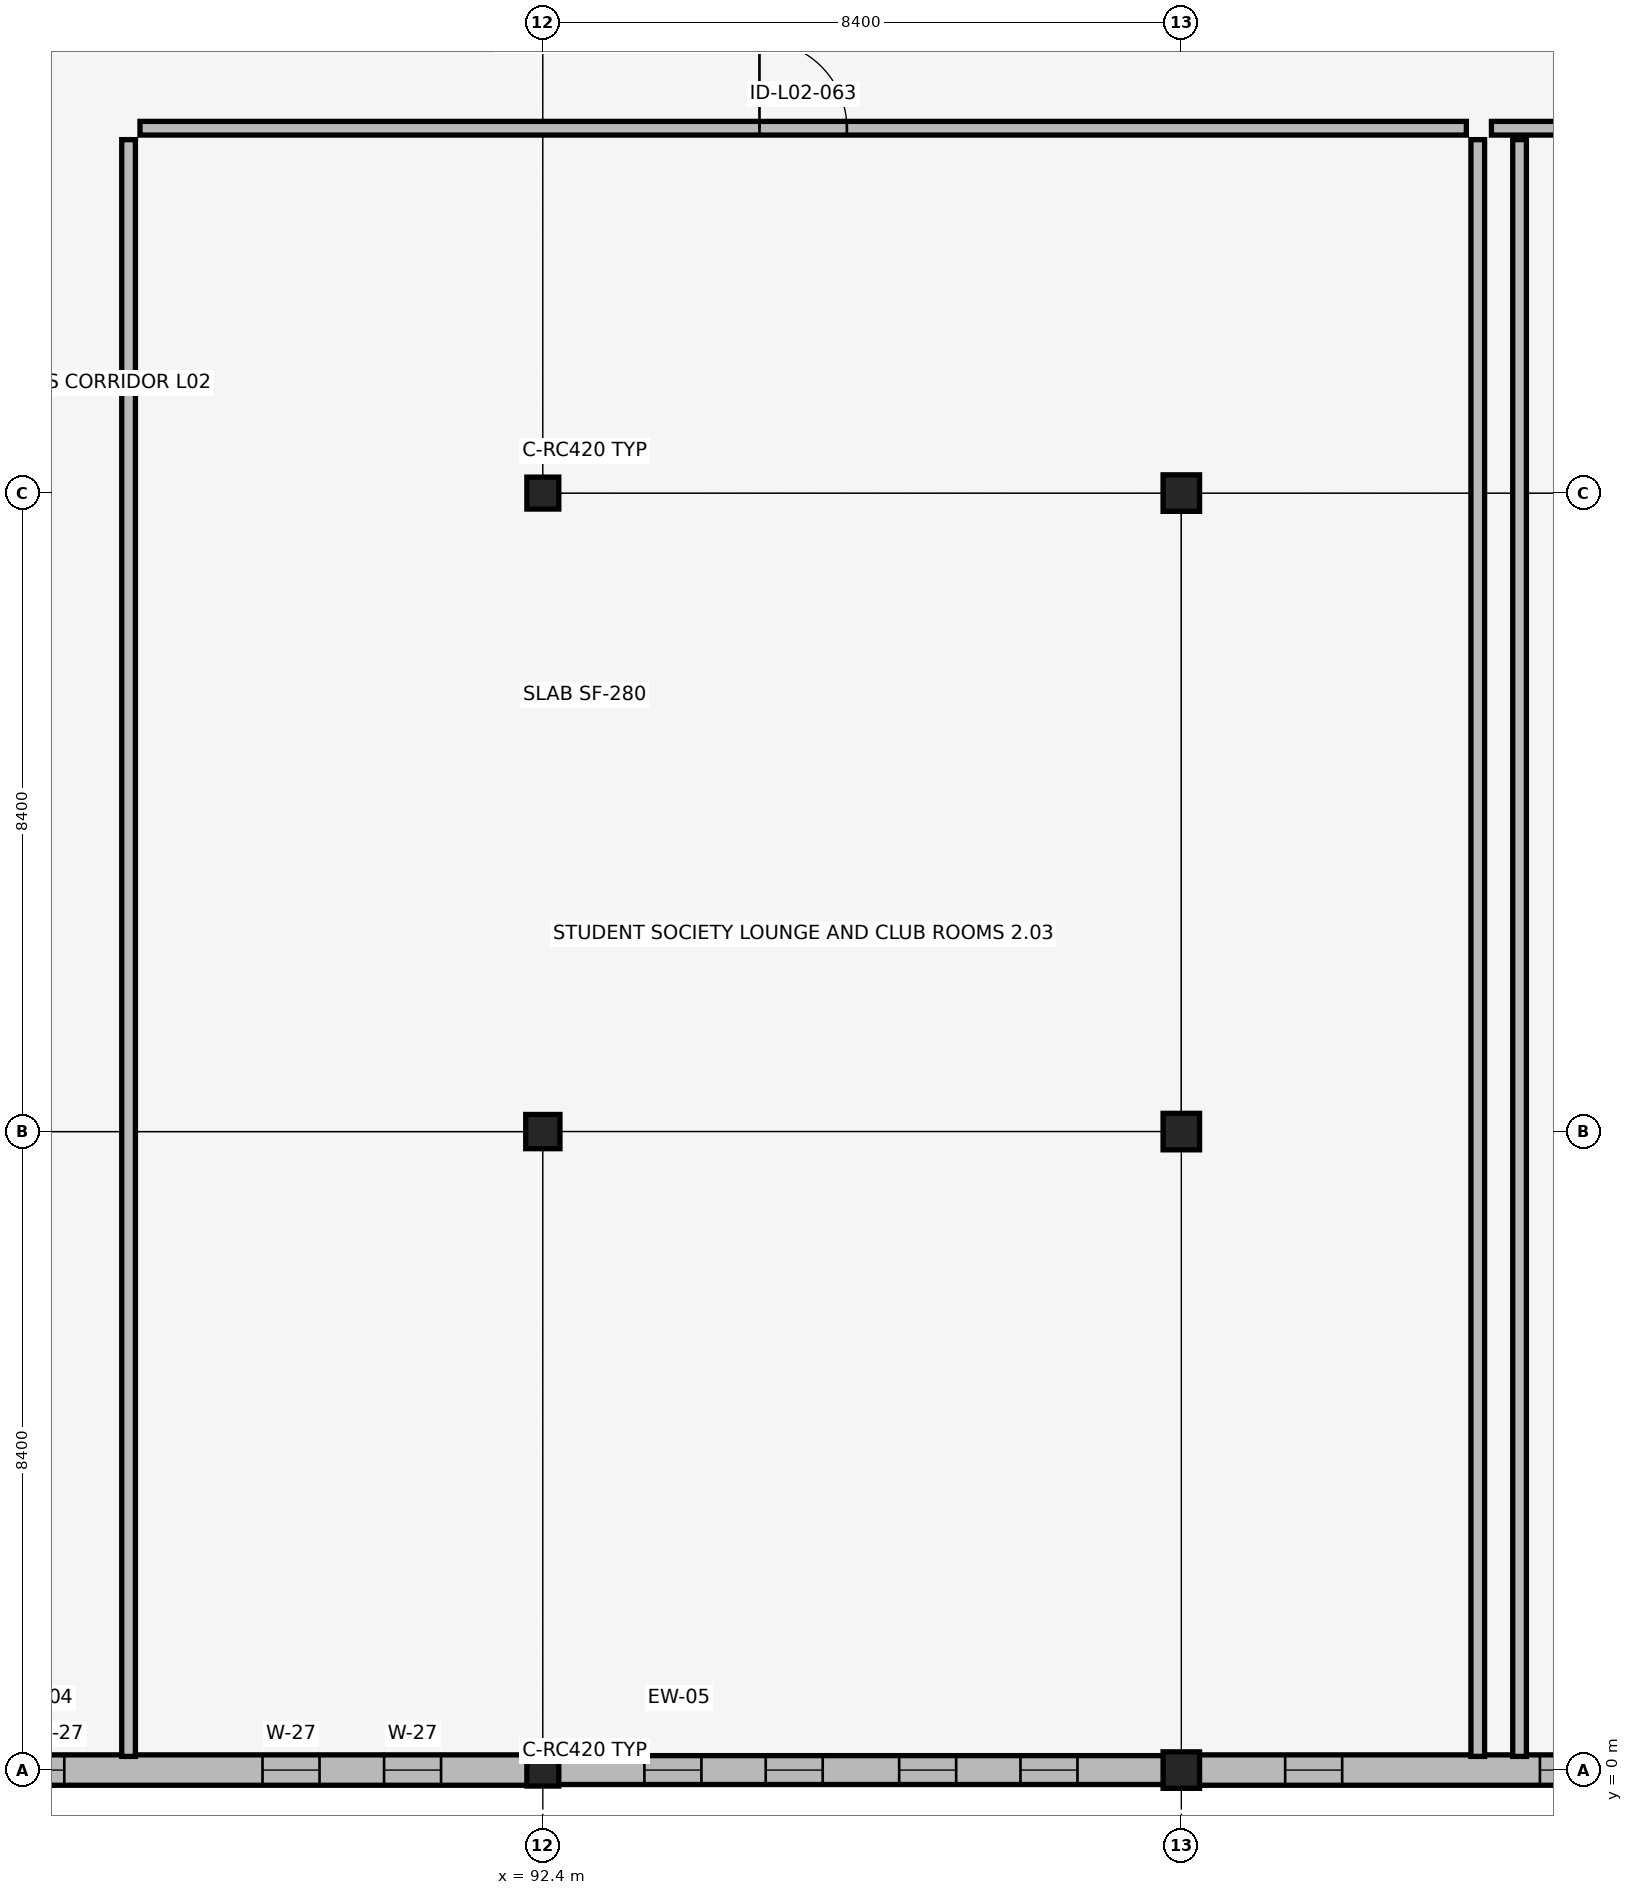
"""IFC4 building model, lengths in metres.
Left out: names, types, materials, properties, quantities, classifications, styles, units other than length and angle.
Written with IfcOpenShell. Run it as: python <this file> out.ifc"""

import sys

from ifc_helpers import new_model, si_unit, direction, frame, frame_2d, origin, origin_2d, place, context, subcontext, project, spatial, rectangle, extrude, element, fill, save


model = new_model("IFC4")
c1 = context("Model", 3, precision=1e-05, world=origin(), true_north=direction((0.0, 1.0)))
c2 = subcontext(c1, "Body", "Model", "MODEL_VIEW")
j1 = project(units=[si_unit("LENGTHUNIT", "METRE"), si_unit("PLANEANGLEUNIT", "RADIAN")], contexts=[c1])
p1 = place(None, origin())
s1 = spatial("IfcSite", under=j1, at=p1, CompositionType="ELEMENT")
p2 = place(p1, origin())
s2 = spatial("IfcBuilding", under=s1, at=p2, CompositionType="ELEMENT")
p3 = place(p2, frame((0.0, 0.0, 9.86)))
s3 = spatial("IfcBuildingStorey", under=s2, at=p3, CompositionType="ELEMENT", Elevation=9.86)
p4 = place(p3, frame((92.4, 0.0, 0.0), z_axis=(0.0, 0.0, 1.0), x_axis=(1.0, 0.0, 0.0)))
e1 = element("IfcColumn", 1, at=p4, inside=s3, PredefinedType="COLUMN", context=c2, shape_type="SweptSolid", body=[
    extrude(rectangle(XDim=0.42, YDim=0.42, at=origin_2d()), origin(), (0.0, 0.0, 1.0), 3.78),
])
p5 = place(p3, frame((92.4, 8.4, 0.0), z_axis=(0.0, 0.0, 1.0), x_axis=(1.0, 0.0, 0.0)))
e2 = element("IfcColumn", 2, at=p5, inside=s3, PredefinedType="COLUMN", context=c2, shape_type="SweptSolid", body=[
    extrude(rectangle(XDim=0.45, YDim=0.45, at=origin_2d()), origin(), (0.0, 0.0, 1.0), 3.78),
])
p6 = place(p3, frame((92.4, 16.8, 0.0), z_axis=(0.0, 0.0, 1.0), x_axis=(1.0, 0.0, 0.0)))
e3 = element("IfcColumn", 3, at=p6, inside=s3, PredefinedType="COLUMN", context=c2, shape_type="SweptSolid", body=[
    extrude(rectangle(XDim=0.42, YDim=0.42, at=origin_2d()), origin(), (0.0, 0.0, 1.0), 3.78),
])
for number, where, z_axis, x_axis in (
    (4, (100.8, 0.0, 0.0), (0.0, 0.0, 1.0), (1.0, 0.0, 0.0)),
    (5, (100.8, 8.4, 0.0), (0.0, 0.0, 1.0), (1.0, 0.0, 0.0)),
    (6, (100.8, 16.8, 0.0), (0.0, 0.0, 1.0), (1.0, 0.0, 0.0)),
):
    element("IfcColumn", number, at=place(p3, frame(where, z_axis=z_axis, x_axis=x_axis)), inside=s3, PredefinedType="COLUMN", context=c2, shape_type="SweptSolid", body=[
        extrude(rectangle(XDim=0.48, YDim=0.48, at=origin_2d()), origin(), (0.0, 0.0, 1.0), 3.78),
    ])
p7 = place(p3, frame((84.21, 0.0, 0.0), z_axis=(0.0, 0.0, 1.0), x_axis=(1.0, 0.0, 0.0)))
e7 = element("IfcWall", 7, at=p7, inside=s3, PredefinedType="SOLIDWALL", context=c2, shape_type="SweptSolid", body=[
    extrude(rectangle(XDim=7.995, YDim=0.4, at=frame_2d((3.998, 0.0))), origin(), (0.0, 0.0, 1.0), 3.02),
])
p8 = place(p7, frame((1.144, 0.0, 0.7)))
e8 = element("IfcOpeningElement", 8, at=p8, cuts=e7, PredefinedType="OPENING", context=c2, shape_type="SweptSolid", body=[
    extrude(rectangle(XDim=0.75, YDim=2.1, at=frame_2d((0.375, 1.05))), frame((0.0, 0.21, 0.0), z_axis=(0.0, -1.0, 0.0), x_axis=(1.0, 0.0, 0.0)), (0.0, 0.0, 1.0), 0.42),
])
p9 = place(p7, frame((4.502, 0.0, 0.7)))
e9 = element("IfcOpeningElement", 9, at=p9, cuts=e7, PredefinedType="OPENING", context=c2, shape_type="SweptSolid", body=[
    extrude(rectangle(XDim=0.75, YDim=2.1, at=frame_2d((0.375, 1.05))), frame((0.0, 0.21, 0.0), z_axis=(0.0, -1.0, 0.0), x_axis=(1.0, 0.0, 0.0)), (0.0, 0.0, 1.0), 0.42),
])
p10 = place(p7, frame((6.101, 0.0, 0.7)))
e10 = element("IfcOpeningElement", 10, at=p10, cuts=e7, PredefinedType="OPENING", context=c2, shape_type="SweptSolid", body=[
    extrude(rectangle(XDim=0.75, YDim=2.1, at=frame_2d((0.375, 1.05))), frame((0.0, 0.21, 0.0), z_axis=(0.0, -1.0, 0.0), x_axis=(1.0, 0.0, 0.0)), (0.0, 0.0, 1.0), 0.42),
])
p11 = place(p3, frame((92.595, 0.0, 0.0), z_axis=(0.0, 0.0, 1.0), x_axis=(1.0, 0.0, 0.0)))
e11 = element("IfcWall", 11, at=p11, inside=s3, PredefinedType="SOLIDWALL", context=c2, shape_type="SweptSolid", body=[
    extrude(rectangle(XDim=7.98, YDim=0.38, at=frame_2d((3.99, 0.0))), origin(), (0.0, 0.0, 1.0), 3.02),
])
p12 = place(p11, frame((1.141, 0.0, 0.7)))
e12 = element("IfcOpeningElement", 12, at=p12, cuts=e11, PredefinedType="OPENING", context=c2, shape_type="SweptSolid", body=[
    extrude(rectangle(XDim=0.75, YDim=2.1, at=frame_2d((0.375, 1.05))), frame((0.0, 0.2, 0.0), z_axis=(0.0, -1.0, 0.0), x_axis=(1.0, 0.0, 0.0)), (0.0, 0.0, 1.0), 0.4),
])
p13 = place(p11, frame((2.737, 0.0, 0.7)))
e13 = element("IfcOpeningElement", 13, at=p13, cuts=e11, PredefinedType="OPENING", context=c2, shape_type="SweptSolid", body=[
    extrude(rectangle(XDim=0.75, YDim=2.1, at=frame_2d((0.375, 1.05))), frame((0.0, 0.2, 0.0), z_axis=(0.0, -1.0, 0.0), x_axis=(1.0, 0.0, 0.0)), (0.0, 0.0, 1.0), 0.4),
])
p14 = place(p11, frame((4.493, 0.0, 0.7)))
e14 = element("IfcOpeningElement", 14, at=p14, cuts=e11, PredefinedType="OPENING", context=c2, shape_type="SweptSolid", body=[
    extrude(rectangle(XDim=0.75, YDim=2.1, at=frame_2d((0.375, 1.05))), frame((0.0, 0.2, 0.0), z_axis=(0.0, -1.0, 0.0), x_axis=(1.0, 0.0, 0.0)), (0.0, 0.0, 1.0), 0.4),
])
p15 = place(p11, frame((6.089, 0.0, 0.7)))
e15 = element("IfcOpeningElement", 15, at=p15, cuts=e11, PredefinedType="OPENING", context=c2, shape_type="SweptSolid", body=[
    extrude(rectangle(XDim=0.75, YDim=2.1, at=frame_2d((0.375, 1.05))), frame((0.0, 0.2, 0.0), z_axis=(0.0, -1.0, 0.0), x_axis=(1.0, 0.0, 0.0)), (0.0, 0.0, 1.0), 0.4),
])
p16 = place(p3, frame((101.025, 0.0, 0.0), z_axis=(0.0, 0.0, 1.0), x_axis=(1.0, 0.0, 0.0)))
e16 = element("IfcWall", 16, at=p16, inside=s3, PredefinedType="SOLIDWALL", context=c2, shape_type="SweptSolid", body=[
    extrude(rectangle(XDim=7.98, YDim=0.4, at=frame_2d((3.99, 0.0))), origin(), (0.0, 0.0, 1.0), 3.02),
])
p17 = place(p16, frame((1.141, 0.0, 0.7)))
e17 = element("IfcOpeningElement", 17, at=p17, cuts=e16, PredefinedType="OPENING", context=c2, shape_type="SweptSolid", body=[
    extrude(rectangle(XDim=0.75, YDim=2.1, at=frame_2d((0.375, 1.05))), frame((0.0, 0.21, 0.0), z_axis=(0.0, -1.0, 0.0), x_axis=(1.0, 0.0, 0.0)), (0.0, 0.0, 1.0), 0.42),
])
p18 = place(p16, frame((4.493, 0.0, 0.7)))
e18 = element("IfcOpeningElement", 18, at=p18, cuts=e16, PredefinedType="OPENING", context=c2, shape_type="SweptSolid", body=[
    extrude(rectangle(XDim=0.75, YDim=2.1, at=frame_2d((0.375, 1.05))), frame((0.0, 0.21, 0.0), z_axis=(0.0, -1.0, 0.0), x_axis=(1.0, 0.0, 0.0)), (0.0, 0.0, 1.0), 0.42),
])
p19 = place(p16, frame((6.089, 0.0, 0.7)))
e19 = element("IfcOpeningElement", 19, at=p19, cuts=e16, PredefinedType="OPENING", context=c2, shape_type="SweptSolid", body=[
    extrude(rectangle(XDim=0.75, YDim=2.1, at=frame_2d((0.375, 1.05))), frame((0.0, 0.21, 0.0), z_axis=(0.0, -1.0, 0.0), x_axis=(1.0, 0.0, 0.0)), (0.0, 0.0, 1.0), 0.42),
])
p20 = place(p3, frame((87.1, 21.6, 0.0), z_axis=(0.0, 0.0, 1.0), x_axis=(1.0, 0.0, 0.0)))
e20 = element("IfcWall", 20, at=p20, inside=s3, PredefinedType="PARTITIONING", context=c2, shape_type="SweptSolid", body=[
    extrude(rectangle(XDim=17.45, YDim=0.18, at=frame_2d((8.725, 0.0))), origin(), (0.0, 0.0, 1.0), 2.96),
])
p21 = place(p20, frame((8.15, 0.0, 0.0)))
e21 = element("IfcOpeningElement", 21, at=p21, cuts=e20, PredefinedType="OPENING", context=c2, shape_type="SweptSolid", body=[
    extrude(rectangle(XDim=1.15, YDim=2.15, at=frame_2d((0.575, 1.075))), frame((0.0, 0.1, 0.0), z_axis=(0.0, -1.0, 0.0), x_axis=(1.0, 0.0, 0.0)), (0.0, 0.0, 1.0), 0.2),
])
for number, where, z_axis, x_axis in (
    (22, (86.95, 0.18, 0.0), (0.0, 0.0, 1.0), (0.0, 1.0, 0.0)),
    (23, (104.7, 0.18, 0.0), (0.0, 0.0, 1.0), (0.0, 1.0, 0.0)),
):
    element("IfcWall", number, at=place(p3, frame(where, z_axis=z_axis, x_axis=x_axis)), inside=s3, PredefinedType="PARTITIONING", context=c2, shape_type="SweptSolid", body=[
        extrude(rectangle(XDim=21.27, YDim=0.18, at=frame_2d((10.635, 0.0))), origin(), (0.0, 0.0, 1.0), 2.92),
    ])
p22 = place(p3, frame((104.88, 21.6, 0.0), z_axis=(0.0, 0.0, 1.0), x_axis=(1.0, 0.0, 0.0)))
e24 = element("IfcWall", 24, at=p22, inside=s3, PredefinedType="PARTITIONING", context=c2, shape_type="SweptSolid", body=[
    extrude(rectangle(XDim=20.52, YDim=0.18, at=frame_2d((10.26, 0.0))), origin(), (0.0, 0.0, 1.0), 2.96),
])
p23 = place(p22, frame((9.385, 0.0, 0.0)))
e25 = element("IfcOpeningElement", 25, at=p23, cuts=e24, PredefinedType="OPENING", context=c2, shape_type="SweptSolid", body=[
    extrude(rectangle(XDim=1.75, YDim=2.3, at=frame_2d((0.875, 1.15))), frame((0.0, 0.1, 0.0), z_axis=(0.0, -1.0, 0.0), x_axis=(1.0, 0.0, 0.0)), (0.0, 0.0, 1.0), 0.2),
])
p24 = place(p3, frame((105.25, 0.18, 0.0), z_axis=(0.0, 0.0, 1.0), x_axis=(0.0, 1.0, 0.0)))
e26 = element("IfcWall", 26, at=p24, inside=s3, PredefinedType="PARTITIONING", context=c2, shape_type="SweptSolid", body=[
    extrude(rectangle(XDim=21.27, YDim=0.18, at=frame_2d((10.635, 0.0))), origin(), (0.0, 0.0, 1.0), 2.92),
])
p25 = place(p8, origin())
e27 = element("IfcWindow", 27, at=p25, inside=s3, PartitioningType="DOUBLE_PANEL_VERTICAL", PredefinedType="WINDOW", context=c2, shape_type="SweptSolid", body=[
    extrude(rectangle(XDim=0.75, YDim=2.1, at=frame_2d((0.375, 1.05))), frame((0.0, 0.03, 0.0), z_axis=(0.0, -1.0, 0.0), x_axis=(1.0, 0.0, 0.0)), (0.0, 0.0, 1.0), 0.06),
])
fill(e8, e27)
p26 = place(p9, origin())
e28 = element("IfcWindow", 28, at=p26, inside=s3, PartitioningType="DOUBLE_PANEL_VERTICAL", PredefinedType="WINDOW", context=c2, shape_type="SweptSolid", body=[
    extrude(rectangle(XDim=0.75, YDim=2.1, at=frame_2d((0.375, 1.05))), frame((0.0, 0.03, 0.0), z_axis=(0.0, -1.0, 0.0), x_axis=(1.0, 0.0, 0.0)), (0.0, 0.0, 1.0), 0.06),
])
fill(e9, e28)
p27 = place(p10, origin())
e29 = element("IfcWindow", 29, at=p27, inside=s3, PartitioningType="DOUBLE_PANEL_VERTICAL", PredefinedType="WINDOW", context=c2, shape_type="SweptSolid", body=[
    extrude(rectangle(XDim=0.75, YDim=2.1, at=frame_2d((0.375, 1.05))), frame((0.0, 0.03, 0.0), z_axis=(0.0, -1.0, 0.0), x_axis=(1.0, 0.0, 0.0)), (0.0, 0.0, 1.0), 0.06),
])
fill(e10, e29)
p28 = place(p12, origin())
e30 = element("IfcWindow", 30, at=p28, inside=s3, PartitioningType="DOUBLE_PANEL_VERTICAL", PredefinedType="WINDOW", context=c2, shape_type="SweptSolid", body=[
    extrude(rectangle(XDim=0.75, YDim=2.1, at=frame_2d((0.375, 1.05))), frame((0.0, 0.03, 0.0), z_axis=(0.0, -1.0, 0.0), x_axis=(1.0, 0.0, 0.0)), (0.0, 0.0, 1.0), 0.06),
])
fill(e12, e30)
p29 = place(p13, origin())
e31 = element("IfcWindow", 31, at=p29, inside=s3, PartitioningType="DOUBLE_PANEL_VERTICAL", PredefinedType="WINDOW", context=c2, shape_type="SweptSolid", body=[
    extrude(rectangle(XDim=0.75, YDim=2.1, at=frame_2d((0.375, 1.05))), frame((0.0, 0.03, 0.0), z_axis=(0.0, -1.0, 0.0), x_axis=(1.0, 0.0, 0.0)), (0.0, 0.0, 1.0), 0.06),
])
fill(e13, e31)
p30 = place(p14, origin())
e32 = element("IfcWindow", 32, at=p30, inside=s3, PartitioningType="DOUBLE_PANEL_VERTICAL", PredefinedType="WINDOW", context=c2, shape_type="SweptSolid", body=[
    extrude(rectangle(XDim=0.75, YDim=2.1, at=frame_2d((0.375, 1.05))), frame((0.0, 0.03, 0.0), z_axis=(0.0, -1.0, 0.0), x_axis=(1.0, 0.0, 0.0)), (0.0, 0.0, 1.0), 0.06),
])
fill(e14, e32)
p31 = place(p15, origin())
e33 = element("IfcWindow", 33, at=p31, inside=s3, PartitioningType="DOUBLE_PANEL_VERTICAL", PredefinedType="WINDOW", context=c2, shape_type="SweptSolid", body=[
    extrude(rectangle(XDim=0.75, YDim=2.1, at=frame_2d((0.375, 1.05))), frame((0.0, 0.03, 0.0), z_axis=(0.0, -1.0, 0.0), x_axis=(1.0, 0.0, 0.0)), (0.0, 0.0, 1.0), 0.06),
])
fill(e15, e33)
p32 = place(p17, origin())
e34 = element("IfcWindow", 34, at=p32, inside=s3, PartitioningType="DOUBLE_PANEL_VERTICAL", PredefinedType="WINDOW", context=c2, shape_type="SweptSolid", body=[
    extrude(rectangle(XDim=0.75, YDim=2.1, at=frame_2d((0.375, 1.05))), frame((0.0, 0.03, 0.0), z_axis=(0.0, -1.0, 0.0), x_axis=(1.0, 0.0, 0.0)), (0.0, 0.0, 1.0), 0.06),
])
fill(e17, e34)
p33 = place(p18, origin())
e35 = element("IfcWindow", 35, at=p33, inside=s3, PartitioningType="DOUBLE_PANEL_VERTICAL", PredefinedType="WINDOW", context=c2, shape_type="SweptSolid", body=[
    extrude(rectangle(XDim=0.75, YDim=2.1, at=frame_2d((0.375, 1.05))), frame((0.0, 0.03, 0.0), z_axis=(0.0, -1.0, 0.0), x_axis=(1.0, 0.0, 0.0)), (0.0, 0.0, 1.0), 0.06),
])
fill(e18, e35)
p34 = place(p21, origin())
e36 = element("IfcDoor", 36, at=p34, inside=s3, OperationType="SINGLE_SWING_LEFT", PredefinedType="DOOR", context=c2, shape_type="SweptSolid", body=[
    extrude(rectangle(XDim=1.15, YDim=2.15, at=frame_2d((0.575, 1.075))), frame((0.0, 0.025, 0.0), z_axis=(0.0, -1.0, 0.0), x_axis=(1.0, 0.0, 0.0)), (0.0, 0.0, 1.0), 0.05),
])
fill(e21, e36)
save(model, sys.argv[1])
